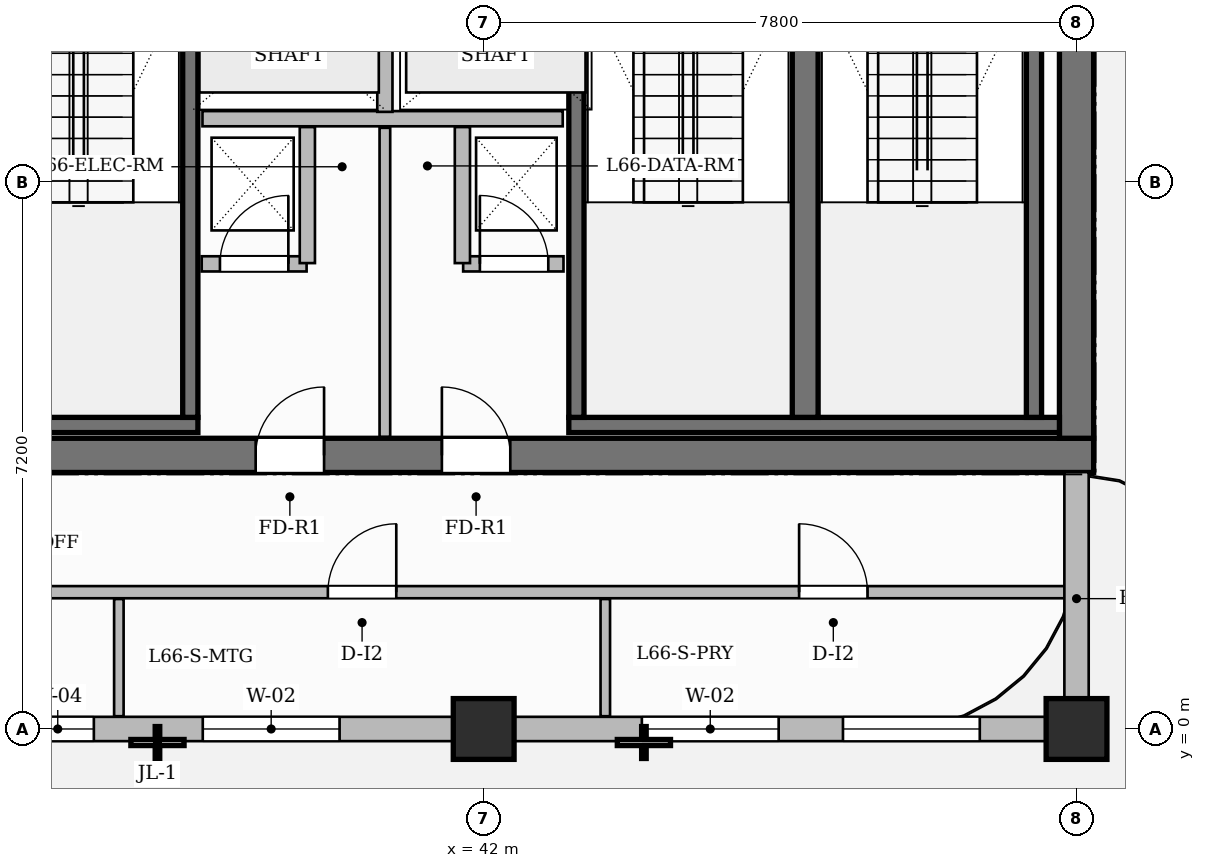
"""IFC4 building model, lengths in metres.
Left out: names, types, materials, properties, quantities, classifications, styles, units other than length and angle.
Written with IfcOpenShell. Run it as: python <this file> out.ifc"""

import sys

from ifc_helpers import new_model, si_unit, direction, frame, frame_2d, origin, origin_2d, place, context, subcontext, project, spatial, rectangle, extrude, source, transform, mapped, element, fill, save


model = new_model("IFC4")
c1 = context("Model", 3, precision=1e-05, world=origin(), true_north=direction((0.0, 1.0)))
c2 = subcontext(c1, "Body", "Model", "MODEL_VIEW")
j1 = project(units=[si_unit("LENGTHUNIT", "METRE"), si_unit("PLANEANGLEUNIT", "RADIAN")], contexts=[c1])
p1 = place(None, origin())
s1 = spatial("IfcSite", under=j1, at=p1, CompositionType="ELEMENT")
p2 = place(p1, origin())
s2 = spatial("IfcBuilding", under=s1, at=p2, CompositionType="ELEMENT")
p3 = place(p2, frame((0.0, 0.0, 263.5)))
s3 = spatial("IfcBuildingStorey", under=s2, at=p3, CompositionType="ELEMENT", Elevation=263.5)
p4 = place(p3, frame((34.575, 3.6, 0.0), z_axis=(0.0, 0.0, 1.0), x_axis=(1.0, 0.0, 0.0)))
e1 = element("IfcWall", 1, at=p4, inside=s3, PredefinedType="SHEAR", context=c2, shape_type="SweptSolid", body=[
    extrude(rectangle(XDim=15.45, YDim=0.45, at=frame_2d((7.725, 0.0))), origin(), (0.0, 0.0, 1.0), 3.85),
])
p5 = place(p4, frame((4.425, 0.0, 0.0)))
e2 = element("IfcOpeningElement", 2, at=p5, cuts=e1, PredefinedType="OPENING", context=c2, shape_type="SweptSolid", body=[
    extrude(rectangle(XDim=0.9, YDim=2.1, at=frame_2d((0.45, 1.05))), frame((0.0, 0.235, 0.0), z_axis=(0.0, -1.0, 0.0), x_axis=(1.0, 0.0, 0.0)), (0.0, 0.0, 1.0), 0.47),
])
p6 = place(p4, frame((6.875, 0.0, 0.0)))
e3 = element("IfcOpeningElement", 3, at=p6, cuts=e1, PredefinedType="OPENING", context=c2, shape_type="SweptSolid", body=[
    extrude(rectangle(XDim=0.9, YDim=2.1, at=frame_2d((0.45, 1.05))), frame((0.0, 0.235, 0.0), z_axis=(0.0, -1.0, 0.0), x_axis=(1.0, 0.0, 0.0)), (0.0, 0.0, 1.0), 0.47),
])
p7 = place(p3, frame((49.8, 3.825, 0.0), z_axis=(0.0, 0.0, 1.0), x_axis=(0.0, 1.0, 0.0)))
e4 = element("IfcWall", 4, at=p7, inside=s3, PredefinedType="SHEAR", context=c2, shape_type="SweptSolid", body=[
    extrude(rectangle(XDim=10.35, YDim=0.45, at=frame_2d((5.175, 0.0))), origin(), (0.0, 0.0, 1.0), 3.85),
])
m1 = source(origin(), c2, "Body", "SweptSolid", [
    extrude(rectangle(XDim=0.8, YDim=0.8, at=origin_2d()), origin(), (0.0, 0.0, 1.0), 3.85),
])
for number, where, z_axis, x_axis in (
    (5, (42.0, 0.0, 0.0), (0.0, 0.0, 1.0), (1.0, 0.0, 0.0)),
    (6, (49.8, 0.0, 0.0), (0.0, 0.0, 1.0), (1.0, 0.0, 0.0)),
):
    element("IfcColumn", number, at=place(p3, frame(where, z_axis=z_axis, x_axis=x_axis)), inside=s3, PredefinedType="COLUMN", context=c2, shape_type="MappedRepresentation", body=[
        mapped(m1, transform((0.0, 0.0, 0.0), scale=1.0)),
    ])
p8 = place(p3, frame((35.025, 4.0, 0.0), z_axis=(0.0, 0.0, 1.0), x_axis=(1.0, 0.0, 0.0)))
e7 = element("IfcWall", 7, at=p8, inside=s3, PredefinedType="SHEAR", context=c2, shape_type="SweptSolid", body=[
    extrude(rectangle(XDim=3.215, YDim=0.2, at=frame_2d((1.607, 0.0))), origin(), (0.0, 0.0, 1.0), 3.85),
])
p9 = place(p3, frame((38.14, 4.1, 0.0), z_axis=(0.0, 0.0, 1.0), x_axis=(0.0, 1.0, 0.0)))
e8 = element("IfcWall", 8, at=p9, inside=s3, PredefinedType="SHEAR", context=c2, shape_type="SweptSolid", body=[
    extrude(rectangle(XDim=6.95, YDim=0.2, at=frame_2d((3.475, 0.0))), origin(), (0.0, 0.0, 1.0), 3.85),
])
p10 = place(p3, frame((43.12, 4.0, 0.0), z_axis=(0.0, 0.0, 1.0), x_axis=(1.0, 0.0, 0.0)))
e9 = element("IfcWall", 9, at=p10, inside=s3, PredefinedType="SHEAR", context=c2, shape_type="SweptSolid", body=[
    extrude(rectangle(XDim=6.455, YDim=0.2, at=frame_2d((3.228, 0.0))), origin(), (0.0, 0.0, 1.0), 3.85),
])
p11 = place(p3, frame((43.22, 4.1, 0.0), z_axis=(0.0, 0.0, 1.0), x_axis=(0.0, 1.0, 0.0)))
e10 = element("IfcWall", 10, at=p11, inside=s3, PredefinedType="SHEAR", context=c2, shape_type="SweptSolid", body=[
    extrude(rectangle(XDim=6.95, YDim=0.2, at=frame_2d((3.475, 0.0))), origin(), (0.0, 0.0, 1.0), 3.85),
])
p12 = place(p3, frame((46.23, 4.1, 0.0), z_axis=(0.0, 0.0, 1.0), x_axis=(0.0, 1.0, 0.0)))
e11 = element("IfcWall", 11, at=p12, inside=s3, PredefinedType="SHEAR", context=c2, shape_type="SweptSolid", body=[
    extrude(rectangle(XDim=6.95, YDim=0.34, at=frame_2d((3.475, 0.0))), origin(), (0.0, 0.0, 1.0), 3.85),
])
p13 = place(p3, frame((49.24, 4.1, 0.0), z_axis=(0.0, 0.0, 1.0), x_axis=(0.0, 1.0, 0.0)))
e12 = element("IfcWall", 12, at=p13, inside=s3, PredefinedType="SHEAR", context=c2, shape_type="SweptSolid", body=[
    extrude(rectangle(XDim=6.95, YDim=0.2, at=frame_2d((3.475, 0.0))), origin(), (0.0, 0.0, 1.0), 3.85),
])
p14 = place(p3, frame((38.3, 8.03, 0.0), z_axis=(0.0, 0.0, 1.0), x_axis=(1.0, 0.0, 0.0)))
e13 = element("IfcWall", 13, at=p14, inside=s3, PredefinedType="PARTITIONING", context=c2, shape_type="SweptSolid", body=[
    extrude(rectangle(XDim=4.74, YDim=0.2, at=frame_2d((2.37, 0.0))), origin(), (0.0, 0.0, 1.0), 3.6),
])
p15 = place(p3, frame((40.7, 8.12, 0.0), z_axis=(0.0, 0.0, 1.0), x_axis=(0.0, 1.0, 0.0)))
e14 = element("IfcWall", 14, at=p15, inside=s3, PredefinedType="PARTITIONING", context=c2, shape_type="SweptSolid", body=[
    extrude(rectangle(XDim=2.18, YDim=0.2, at=frame_2d((1.09, 0.0))), origin(), (0.0, 0.0, 1.0), 3.6),
])
p16 = place(p3, frame((38.29, 6.12, 0.0), z_axis=(0.0, 0.0, 1.0), x_axis=(1.0, 0.0, 0.0)))
e15 = element("IfcWall", 15, at=p16, inside=s3, PredefinedType="PARTITIONING", context=c2, shape_type="SweptSolid", body=[
    extrude(rectangle(XDim=1.38, YDim=0.2, at=frame_2d((0.69, 0.0))), origin(), (0.0, 0.0, 1.0), 3.6),
])
p17 = place(p16, frame((0.24, 0.0, 0.0)))
e16 = element("IfcOpeningElement", 16, at=p17, cuts=e15, PredefinedType="OPENING", context=c2, shape_type="SweptSolid", body=[
    extrude(rectangle(XDim=0.9, YDim=2.1, at=frame_2d((0.45, 1.05))), frame((0.0, 0.11, 0.0), z_axis=(0.0, -1.0, 0.0), x_axis=(1.0, 0.0, 0.0)), (0.0, 0.0, 1.0), 0.22),
])
p18 = place(p3, frame((39.68, 6.13, 0.0), z_axis=(0.0, 0.0, 1.0), x_axis=(0.0, 1.0, 0.0)))
e17 = element("IfcWall", 17, at=p18, inside=s3, PredefinedType="PARTITIONING", context=c2, shape_type="SweptSolid", body=[
    extrude(rectangle(XDim=1.79, YDim=0.2, at=frame_2d((0.895, 0.0))), origin(), (0.0, 0.0, 1.0), 3.6),
])
p19 = place(p3, frame((41.73, 6.12, 0.0), z_axis=(0.0, 0.0, 1.0), x_axis=(1.0, 0.0, 0.0)))
e18 = element("IfcWall", 18, at=p19, inside=s3, PredefinedType="PARTITIONING", context=c2, shape_type="SweptSolid", body=[
    extrude(rectangle(XDim=1.32, YDim=0.2, at=frame_2d((0.66, 0.0))), origin(), (0.0, 0.0, 1.0), 3.6),
])
p20 = place(p19, frame((0.22, 0.0, 0.0)))
e19 = element("IfcOpeningElement", 19, at=p20, cuts=e18, PredefinedType="OPENING", context=c2, shape_type="SweptSolid", body=[
    extrude(rectangle(XDim=0.9, YDim=2.1, at=frame_2d((0.45, 1.05))), frame((0.0, 0.11, 0.0), z_axis=(0.0, -1.0, 0.0), x_axis=(1.0, 0.0, 0.0)), (0.0, 0.0, 1.0), 0.22),
])
p21 = place(p3, frame((41.72, 6.13, 0.0), z_axis=(0.0, 0.0, 1.0), x_axis=(0.0, 1.0, 0.0)))
e20 = element("IfcWall", 20, at=p21, inside=s3, PredefinedType="PARTITIONING", context=c2, shape_type="SweptSolid", body=[
    extrude(rectangle(XDim=1.79, YDim=0.2, at=frame_2d((0.895, 0.0))), origin(), (0.0, 0.0, 1.0), 3.6),
])
p22 = place(p3, frame((40.7, 3.845, 0.0), z_axis=(0.0, 0.0, 1.0), x_axis=(0.0, 1.0, 0.0)))
e21 = element("IfcWall", 21, at=p22, inside=s3, PredefinedType="PARTITIONING", context=c2, shape_type="SweptSolid", body=[
    extrude(rectangle(XDim=4.065, YDim=0.14, at=frame_2d((2.032, 0.0))), origin(), (0.0, 0.0, 1.0), 3.6),
])
p23 = place(p3, frame((30.29, 1.8, 0.0), z_axis=(0.0, 0.0, 1.0), x_axis=(1.0, 0.0, 0.0)))
e22 = element("IfcWall", 22, at=p23, inside=s3, PredefinedType="PARTITIONING", context=c2, shape_type="SweptSolid", body=[
    extrude(rectangle(XDim=19.37, YDim=0.16, at=frame_2d((9.685, 0.0))), origin(), (0.0, 0.0, 1.0), 3.6),
])
p24 = place(p23, frame((3.054, 0.0, 0.0)))
e23 = element("IfcOpeningElement", 23, at=p24, cuts=e22, PredefinedType="OPENING", context=c2, shape_type="SweptSolid", body=[
    extrude(rectangle(XDim=0.9, YDim=2.15, at=frame_2d((0.45, 1.075))), frame((0.0, 0.09, 0.0), z_axis=(0.0, -1.0, 0.0), x_axis=(1.0, 0.0, 0.0)), (0.0, 0.0, 1.0), 0.18),
])
p25 = place(p23, frame((9.66, 0.0, 0.0)))
e24 = element("IfcOpeningElement", 24, at=p25, cuts=e22, PredefinedType="OPENING", context=c2, shape_type="SweptSolid", body=[
    extrude(rectangle(XDim=0.9, YDim=2.15, at=frame_2d((0.45, 1.075))), frame((0.0, 0.09, 0.0), z_axis=(0.0, -1.0, 0.0), x_axis=(1.0, 0.0, 0.0)), (0.0, 0.0, 1.0), 0.18),
])
p26 = place(p23, frame((15.86, 0.0, 0.0)))
e25 = element("IfcOpeningElement", 25, at=p26, cuts=e22, PredefinedType="OPENING", context=c2, shape_type="SweptSolid", body=[
    extrude(rectangle(XDim=0.9, YDim=2.15, at=frame_2d((0.45, 1.075))), frame((0.0, 0.09, 0.0), z_axis=(0.0, -1.0, 0.0), x_axis=(1.0, 0.0, 0.0)), (0.0, 0.0, 1.0), 0.18),
])
for number, where, z_axis, x_axis in (
    (26, (37.2, 0.168, 0.0), (0.0, 0.0, 1.0), (0.0, 1.0, 0.0)),
    (27, (43.6, 0.168, 0.0), (0.0, 0.0, 1.0), (0.0, 1.0, 0.0)),
):
    element("IfcWall", number, at=place(p3, frame(where, z_axis=z_axis, x_axis=x_axis)), inside=s3, PredefinedType="PARTITIONING", context=c2, shape_type="SweptSolid", body=[
        extrude(rectangle(XDim=1.542, YDim=0.125, at=frame_2d((0.771, 0.0))), origin(), (0.0, 0.0, 1.0), 3.6),
    ])
p27 = place(p3, frame((18.0, 0.0, 0.0), z_axis=(0.0, 0.0, 1.0), x_axis=(1.0, 0.0, 0.0)))
e28 = element("IfcWall", 28, at=p27, inside=s3, PredefinedType="SOLIDWALL", context=c2, shape_type="SweptSolid", body=[
    extrude(rectangle(XDim=31.8, YDim=0.32, at=frame_2d((15.9, 0.0))), origin(), (0.0, 0.0, 1.0), 3.185),
])
p28 = place(p27, frame((0.42, 0.0, 0.0)))
e29 = element("IfcOpeningElement", 29, at=p28, cuts=e28, PredefinedType="OPENING", context=c2, shape_type="SweptSolid", body=[
    extrude(rectangle(XDim=1.2, YDim=2.2, at=frame_2d((0.6, 1.1))), frame((0.0, 0.17, 0.0), z_axis=(0.0, -1.0, 0.0), x_axis=(1.0, 0.0, 0.0)), (0.0, 0.0, 1.0), 0.34),
])
p29 = place(p27, frame((4.721, 0.0, 0.8)))
e30 = element("IfcOpeningElement", 30, at=p29, cuts=e28, PredefinedType="OPENING", context=c2, shape_type="SweptSolid", body=[
    extrude(rectangle(XDim=1.15, YDim=1.8, at=frame_2d((0.575, 0.9))), frame((0.0, 0.17, 0.0), z_axis=(0.0, -1.0, 0.0), x_axis=(1.0, 0.0, 0.0)), (0.0, 0.0, 1.0), 0.34),
])
p30 = place(p27, frame((7.204, 0.0, 0.8)))
e31 = element("IfcOpeningElement", 31, at=p30, cuts=e28, PredefinedType="OPENING", context=c2, shape_type="SweptSolid", body=[
    extrude(rectangle(XDim=1.8, YDim=1.85, at=frame_2d((0.9, 0.925))), frame((0.0, 0.17, 0.0), z_axis=(0.0, -1.0, 0.0), x_axis=(1.0, 0.0, 0.0)), (0.0, 0.0, 1.0), 0.34),
])
p31 = place(p27, frame((13.204, 0.0, 0.8)))
e32 = element("IfcOpeningElement", 32, at=p31, cuts=e28, PredefinedType="OPENING", context=c2, shape_type="SweptSolid", body=[
    extrude(rectangle(XDim=1.8, YDim=1.85, at=frame_2d((0.9, 0.925))), frame((0.0, 0.17, 0.0), z_axis=(0.0, -1.0, 0.0), x_axis=(1.0, 0.0, 0.0)), (0.0, 0.0, 1.0), 0.34),
])
p32 = place(p27, frame((17.921, 0.0, 0.8)))
e33 = element("IfcOpeningElement", 33, at=p32, cuts=e28, PredefinedType="OPENING", context=c2, shape_type="SweptSolid", body=[
    extrude(rectangle(XDim=0.95, YDim=1.75, at=frame_2d((0.475, 0.875))), frame((0.0, 0.17, 0.0), z_axis=(0.0, -1.0, 0.0), x_axis=(1.0, 0.0, 0.0)), (0.0, 0.0, 1.0), 0.34),
])
p33 = place(p27, frame((20.304, 0.0, 0.8)))
e34 = element("IfcOpeningElement", 34, at=p33, cuts=e28, PredefinedType="OPENING", context=c2, shape_type="SweptSolid", body=[
    extrude(rectangle(XDim=1.8, YDim=1.85, at=frame_2d((0.9, 0.925))), frame((0.0, 0.17, 0.0), z_axis=(0.0, -1.0, 0.0), x_axis=(1.0, 0.0, 0.0)), (0.0, 0.0, 1.0), 0.34),
])
p34 = place(p27, frame((26.081, 0.0, 0.8)))
e35 = element("IfcOpeningElement", 35, at=p34, cuts=e28, PredefinedType="OPENING", context=c2, shape_type="SweptSolid", body=[
    extrude(rectangle(XDim=1.8, YDim=1.85, at=frame_2d((0.9, 0.925))), frame((0.0, 0.17, 0.0), z_axis=(0.0, -1.0, 0.0), x_axis=(1.0, 0.0, 0.0)), (0.0, 0.0, 1.0), 0.34),
])
p35 = place(p27, frame((28.727, 0.0, 0.8)))
e36 = element("IfcOpeningElement", 36, at=p35, cuts=e28, PredefinedType="OPENING", context=c2, shape_type="SweptSolid", body=[
    extrude(rectangle(XDim=1.8, YDim=1.85, at=frame_2d((0.9, 0.925))), frame((0.0, 0.17, 0.0), z_axis=(0.0, -1.0, 0.0), x_axis=(1.0, 0.0, 0.0)), (0.0, 0.0, 1.0), 0.34),
])
p36 = place(p3, frame((49.8, 0.05, 0.0), z_axis=(0.0, 0.0, 1.0), x_axis=(0.0, 1.0, 0.0)))
e37 = element("IfcWall", 37, at=p36, inside=s3, PredefinedType="SOLIDWALL", context=c2, shape_type="SweptSolid", body=[
    extrude(rectangle(XDim=3.33, YDim=0.32, at=frame_2d((1.665, 0.0))), origin(), (0.0, 0.0, 1.0), 3.6),
])
m2 = source(origin(), c2, "Body", "SweptSolid", [
    extrude(rectangle(XDim=0.9, YDim=2.1, at=frame_2d((0.45, 1.05))), frame((0.0, 0.025, 0.0), z_axis=(0.0, -1.0, 0.0), x_axis=(1.0, 0.0, 0.0)), (0.0, 0.0, 1.0), 0.05),
])
p37 = place(p17, origin())
e38 = element("IfcDoor", 38, at=p37, inside=s3, OperationType="SINGLE_SWING_RIGHT", PredefinedType="DOOR", context=c2, shape_type="MappedRepresentation", body=[
    mapped(m2, transform((0.0, 0.0, 0.0), scale=1.0)),
])
fill(e16, e38)
p38 = place(p20, origin())
e39 = element("IfcDoor", 39, at=p38, inside=s3, OperationType="SINGLE_SWING_LEFT", PredefinedType="DOOR", context=c2, shape_type="MappedRepresentation", body=[
    mapped(m2, transform((0.0, 0.0, 0.0), scale=1.0)),
])
fill(e19, e39)
p39 = place(p5, origin())
e40 = element("IfcDoor", 40, at=p39, inside=s3, OperationType="SINGLE_SWING_RIGHT", PredefinedType="DOOR", context=c2, shape_type="MappedRepresentation", body=[
    mapped(m2, transform((0.0, 0.0, 0.0), scale=1.0)),
])
fill(e2, e40)
p40 = place(p6, origin())
e41 = element("IfcDoor", 41, at=p40, inside=s3, OperationType="SINGLE_SWING_LEFT", PredefinedType="DOOR", context=c2, shape_type="MappedRepresentation", body=[
    mapped(m2, transform((0.0, 0.0, 0.0), scale=1.0)),
])
fill(e3, e41)
m3 = source(origin(), c2, "Body", "SweptSolid", [
    extrude(rectangle(XDim=0.9, YDim=2.15, at=frame_2d((0.45, 1.075))), frame((0.0, 0.025, 0.0), z_axis=(0.0, -1.0, 0.0), x_axis=(1.0, 0.0, 0.0)), (0.0, 0.0, 1.0), 0.05),
])
p41 = place(p25, origin())
e42 = element("IfcDoor", 42, at=p41, inside=s3, OperationType="SINGLE_SWING_RIGHT", PredefinedType="DOOR", context=c2, shape_type="MappedRepresentation", body=[
    mapped(m3, transform((0.0, 0.0, 0.0), scale=1.0)),
])
fill(e24, e42)
p42 = place(p26, origin())
e43 = element("IfcDoor", 43, at=p42, inside=s3, OperationType="SINGLE_SWING_LEFT", PredefinedType="DOOR", context=c2, shape_type="MappedRepresentation", body=[
    mapped(m3, transform((0.0, 0.0, 0.0), scale=1.0)),
])
fill(e25, e43)
m4 = source(origin(), c2, "Body", "SweptSolid", [
    extrude(rectangle(XDim=0.95, YDim=1.75, at=frame_2d((0.475, 0.875))), frame((0.0, 0.03, 0.0), z_axis=(0.0, -1.0, 0.0), x_axis=(1.0, 0.0, 0.0)), (0.0, 0.0, 1.0), 0.06),
])
p43 = place(p32, origin())
e44 = element("IfcWindow", 44, at=p43, inside=s3, PartitioningType="SINGLE_PANEL", PredefinedType="WINDOW", context=c2, shape_type="MappedRepresentation", body=[
    mapped(m4, transform((0.0, 0.0, 0.0), scale=1.0)),
])
fill(e33, e44)
m5 = source(origin(), c2, "Body", "SweptSolid", [
    extrude(rectangle(XDim=1.8, YDim=1.85, at=frame_2d((0.9, 0.925))), frame((0.0, 0.03, 0.0), z_axis=(0.0, -1.0, 0.0), x_axis=(1.0, 0.0, 0.0)), (0.0, 0.0, 1.0), 0.06),
])
p44 = place(p33, origin())
e45 = element("IfcWindow", 45, at=p44, inside=s3, PartitioningType="DOUBLE_PANEL_VERTICAL", PredefinedType="WINDOW", context=c2, shape_type="MappedRepresentation", body=[
    mapped(m5, transform((0.0, 0.0, 0.0), scale=1.0)),
])
fill(e34, e45)
p45 = place(p34, origin())
e46 = element("IfcWindow", 46, at=p45, inside=s3, PartitioningType="DOUBLE_PANEL_VERTICAL", PredefinedType="WINDOW", context=c2, shape_type="MappedRepresentation", body=[
    mapped(m5, transform((0.0, 0.0, 0.0), scale=1.0)),
])
fill(e35, e46)
p46 = place(p35, origin())
e47 = element("IfcWindow", 47, at=p46, inside=s3, PartitioningType="DOUBLE_PANEL_VERTICAL", PredefinedType="WINDOW", context=c2, shape_type="MappedRepresentation", body=[
    mapped(m5, transform((0.0, 0.0, 0.0), scale=1.0)),
])
fill(e36, e47)
save(model, sys.argv[1])
